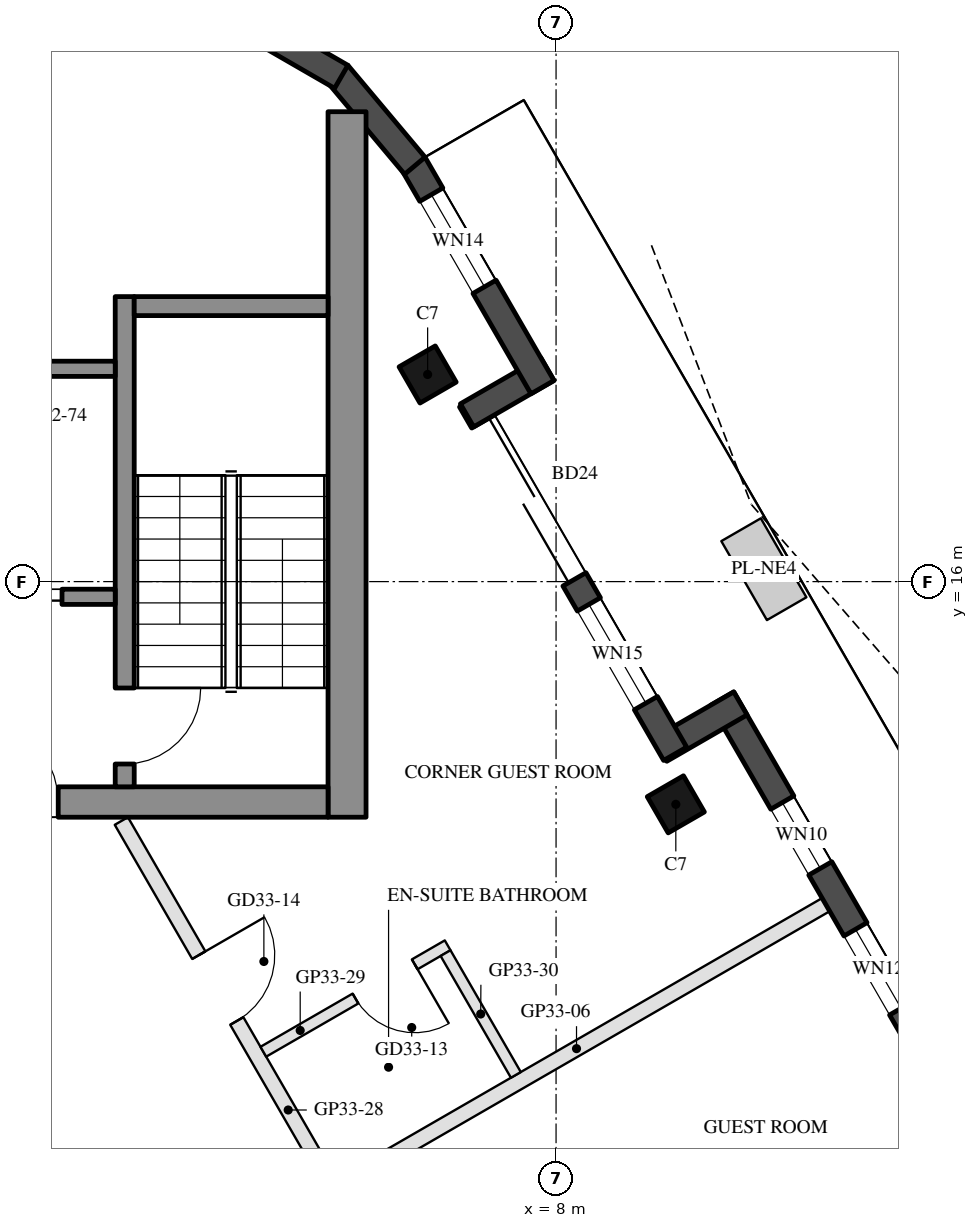
"""IFC4 building model, lengths in metres.
Left out: names, types, materials, properties, quantities, classifications, styles, units other than length and angle.
Written with IfcOpenShell. Run it as: python <this file> out.ifc"""

import sys

from ifc_helpers import new_model, si_unit, direction, frame, frame_2d, origin, origin_2d, place, context, subcontext, project, spatial, rectangle, hollow_rectangle, extrude, boolean, halfspace, element, fill, save


model = new_model("IFC4")
c1 = context("Model", 3, precision=1e-05, world=origin(), true_north=direction((0.0, 1.0)))
c2 = subcontext(c1, "Body", "Model", "MODEL_VIEW")
j1 = project(units=[si_unit("LENGTHUNIT", "METRE"), si_unit("PLANEANGLEUNIT", "RADIAN")], contexts=[c1])
p1 = place(None, origin())
s1 = spatial("IfcSite", under=j1, at=p1, CompositionType="ELEMENT")
p2 = place(p1, origin())
s2 = spatial("IfcBuilding", under=s1, at=p2, CompositionType="ELEMENT")
p3 = place(p2, frame((0.0, 0.0, 317.0)))
s3 = spatial("IfcBuildingStorey", under=s2, at=p3, CompositionType="ELEMENT", Elevation=317.0)
p4 = place(p3, frame((9.576, 13.07, 0.0), z_axis=(0.0, 0.0, 1.0), x_axis=(-0.5, 0.866025403784, 0.0)))
e1 = element("IfcColumn", 1, at=p4, inside=s3, PredefinedType="COLUMN", context=c2, shape_type="SweptSolid", body=[
    boolean("DIFFERENCE", extrude(hollow_rectangle(XDim=0.55, YDim=0.55, WallThickness=0.025, at=origin_2d()), origin(), (0.0, 0.0, 1.0), 3.7), halfspace(frame((0.0, 0.0, 3.666), z_axis=(0.0, 0.0, 1.0), x_axis=(1.0, 0.0, 0.0)), False)),
])
p5 = place(p3, frame((6.31, 18.725, 0.0), z_axis=(0.0, 0.0, 1.0), x_axis=(-0.5, 0.866025403784, 0.0)))
e2 = element("IfcColumn", 2, at=p5, inside=s3, PredefinedType="COLUMN", context=c2, shape_type="SweptSolid", body=[
    boolean("DIFFERENCE", extrude(hollow_rectangle(XDim=0.55, YDim=0.55, WallThickness=0.025, at=origin_2d()), origin(), (0.0, 0.0, 1.0), 3.7), halfspace(frame((0.0, 0.0, 3.66), z_axis=(0.0, 0.0, 1.0), x_axis=(1.0, 0.0, 0.0)), False)),
])
p6 = place(p3, frame((14.352, 7.247, 0.0), z_axis=(0.0, 0.0, 1.0), x_axis=(-0.499993893925, 0.8660289291, 0.0)))
e3 = element("IfcWall", 3, at=p6, inside=s3, PredefinedType="SOLIDWALL", context=c2, shape_type="SweptSolid", body=[
    extrude(rectangle(XDim=8.331, YDim=0.35, at=frame_2d((4.165, 0.0))), origin(), (0.0, 0.0, 1.0), 3.55),
])
p7 = place(p6, frame((1.525, 0.0, 0.0)))
e4 = element("IfcOpeningElement", 4, at=p7, cuts=e3, PredefinedType="OPENING", context=c2, shape_type="SweptSolid", body=[
    extrude(rectangle(XDim=1.8, YDim=2.4, at=frame_2d((0.9, 1.2))), frame((0.0, 0.185, 0.0), z_axis=(0.0, -1.0, 0.0), x_axis=(1.0, 0.0, 0.0)), (0.0, 0.0, 1.0), 0.37),
])
p8 = place(p6, frame((3.625, 0.0, 0.3)))
e5 = element("IfcOpeningElement", 5, at=p8, cuts=e3, PredefinedType="OPENING", context=c2, shape_type="SweptSolid", body=[
    extrude(rectangle(XDim=1.2, YDim=2.65, at=frame_2d((0.6, 1.325))), frame((0.0, 0.185, 0.0), z_axis=(0.0, -1.0, 0.0), x_axis=(1.0, 0.0, 0.0)), (0.0, 0.0, 1.0), 0.37),
])
p9 = place(p6, frame((5.75, 0.0, 0.3)))
e6 = element("IfcOpeningElement", 6, at=p9, cuts=e3, PredefinedType="OPENING", context=c2, shape_type="SweptSolid", body=[
    extrude(rectangle(XDim=1.0, YDim=2.65, at=frame_2d((0.5, 1.325))), frame((0.0, 0.185, 0.0), z_axis=(0.0, -1.0, 0.0), x_axis=(1.0, 0.0, 0.0)), (0.0, 0.0, 1.0), 0.37),
])
p10 = place(p3, frame((10.426, 14.397, 0.0), z_axis=(0.0, 0.0, 1.0), x_axis=(-0.866005645448, -0.500034220881, 0.0)))
e7 = element("IfcWall", 7, at=p10, inside=s3, PredefinedType="SOLIDWALL", context=c2, shape_type="SweptSolid", body=[
    extrude(rectangle(XDim=1.22, YDim=0.35, at=frame_2d((0.61, 0.0))), origin(), (0.0, 0.0, 1.0), 3.55),
])
p11 = place(p3, frame((9.567, 13.734, 0.0), z_axis=(0.0, 0.0, 1.0), x_axis=(-0.499996591357, 0.866027371756, 0.0)))
e8 = element("IfcWall", 8, at=p11, inside=s3, PredefinedType="SOLIDWALL", context=c2, shape_type="SweptSolid", body=[
    extrude(rectangle(XDim=5.371, YDim=0.35, at=frame_2d((2.685, 0.0))), origin(), (0.0, 0.0, 1.0), 3.55),
])
p12 = place(p11, frame((2.65, 0.0, 0.0)))
e9 = element("IfcOpeningElement", 9, at=p12, cuts=e8, PredefinedType="OPENING", context=c2, shape_type="SweptSolid", body=[
    extrude(rectangle(XDim=2.4, YDim=2.4, at=frame_2d((1.2, 1.2))), frame((0.0, 0.185, 0.0), z_axis=(0.0, -1.0, 0.0), x_axis=(1.0, 0.0, 0.0)), (0.0, 0.0, 1.0), 0.37),
])
p13 = place(p11, frame((0.77, 0.0, 0.3)))
e10 = element("IfcOpeningElement", 10, at=p13, cuts=e8, PredefinedType="OPENING", context=c2, shape_type="SweptSolid", body=[
    extrude(rectangle(XDim=1.5, YDim=2.65, at=frame_2d((0.75, 1.325))), frame((0.0, 0.185, 0.0), z_axis=(0.0, -1.0, 0.0), x_axis=(1.0, 0.0, 0.0)), (0.0, 0.0, 1.0), 0.37),
])
p14 = place(p3, frame((6.829, 18.188, 0.0), z_axis=(0.0, 0.0, 1.0), x_axis=(0.866042269935, 0.499970785833, 0.0)))
e11 = element("IfcWall", 11, at=p14, inside=s3, PredefinedType="SOLIDWALL", context=c2, shape_type="SweptSolid", body=[
    extrude(rectangle(XDim=1.22, YDim=0.35, at=frame_2d((0.61, 0.0))), origin(), (0.0, 0.0, 1.0), 3.55),
])
p15 = place(p3, frame((7.821, 18.558, 0.0), z_axis=(0.0, 0.0, 1.0), x_axis=(-0.500000656212, 0.86602502492, 0.0)))
e12 = element("IfcWall", 12, at=p15, inside=s3, PredefinedType="SOLIDWALL", context=c2, shape_type="SweptSolid", body=[
    extrude(rectangle(XDim=3.393, YDim=0.35, at=frame_2d((1.697, 0.0))), origin(), (0.0, 0.0, 1.0), 3.55),
])
p16 = place(p15, frame((1.525, 0.0, 0.3)))
e13 = element("IfcOpeningElement", 13, at=p16, cuts=e12, PredefinedType="OPENING", context=c2, shape_type="SweptSolid", body=[
    extrude(rectangle(XDim=1.4, YDim=2.65, at=frame_2d((0.7, 1.325))), frame((0.0, 0.185, 0.0), z_axis=(0.0, -1.0, 0.0), x_axis=(1.0, 0.0, 0.0)), (0.0, 0.0, 1.0), 0.37),
])
for number, where, z_axis, x_axis in (
    (14, (6.142, 21.472, 0.0), (0.0, 0.0, 1.0), (-0.643, 0.766, 0.0)),
    (15, (5.174, 22.642, 0.0), (0.0, 0.0, 1.0), (-0.866, 0.5, 0.0)),
):
    element("IfcWall", number, at=place(p3, frame(where, z_axis=z_axis, x_axis=x_axis)), inside=s3, PredefinedType="SOLIDWALL", context=c2, shape_type="SweptSolid", body=[
        extrude(rectangle(XDim=1.579, YDim=0.35, at=frame_2d((0.79, 0.0))), origin(), (0.0, 0.0, 1.0), 3.55),
    ])
p17 = place(p3, frame((5.25, 12.9, 0.0), z_axis=(0.0, 0.0, 1.0), x_axis=(0.0, 1.0, 0.0)))
e16 = element("IfcWall", 16, at=p17, inside=s3, PredefinedType="SHEAR", context=c2, shape_type="SweptSolid", body=[
    extrude(rectangle(XDim=9.283, YDim=0.5, at=frame_2d((4.641, 0.0))), origin(), (0.0, 0.0, 1.0), 3.5),
])
p18 = place(p3, frame((5.0, 13.1, 0.0), z_axis=(0.0, 0.0, 1.0), x_axis=(-1.0, 0.0, 0.0)))
e17 = element("IfcWall", 17, at=p18, inside=s3, PredefinedType="SHEAR", context=c2, shape_type="SweptSolid", body=[
    extrude(rectangle(XDim=10.0, YDim=0.4, at=frame_2d((5.0, 0.0))), origin(), (0.0, 0.0, 1.0), 3.5),
])
p19 = place(p18, frame((3.55, 0.0, 0.0)))
e18 = element("IfcOpeningElement", 18, at=p19, cuts=e17, PredefinedType="OPENING", context=c2, shape_type="SweptSolid", body=[
    extrude(rectangle(XDim=1.1, YDim=2.1, at=frame_2d((0.55, 1.05))), frame((0.0, 0.21, 0.0), z_axis=(0.0, -1.0, 0.0), x_axis=(1.0, 0.0, 0.0)), (0.0, 0.0, 1.0), 0.42),
])
p20 = place(p18, frame((5.85, 0.0, 0.0)))
e19 = element("IfcOpeningElement", 19, at=p20, cuts=e17, PredefinedType="OPENING", context=c2, shape_type="SweptSolid", body=[
    extrude(rectangle(XDim=1.4, YDim=2.1, at=frame_2d((0.7, 1.05))), frame((0.0, 0.21, 0.0), z_axis=(0.0, -1.0, 0.0), x_axis=(1.0, 0.0, 0.0)), (0.0, 0.0, 1.0), 0.42),
])
p21 = place(p3, frame((2.325, 13.3, 0.0), z_axis=(0.0, 0.0, 1.0), x_axis=(0.0, 1.0, 0.0)))
e20 = element("IfcWall", 20, at=p21, inside=s3, PredefinedType="SHEAR", context=c2, shape_type="SweptSolid", body=[
    extrude(rectangle(XDim=6.45, YDim=0.25, at=frame_2d((3.225, 0.0))), origin(), (0.0, 0.0, 1.0), 3.5),
])
p22 = place(p21, frame((0.3, 0.0, 0.0)))
e21 = element("IfcOpeningElement", 21, at=p22, cuts=e20, PredefinedType="OPENING", context=c2, shape_type="SweptSolid", body=[
    extrude(rectangle(XDim=1.0, YDim=2.1, at=frame_2d((0.5, 1.05))), frame((0.0, 0.135, 0.0), z_axis=(0.0, -1.0, 0.0), x_axis=(1.0, 0.0, 0.0)), (0.0, 0.0, 1.0), 0.27),
])
p23 = place(p3, frame((5.0, 19.625, 0.0), z_axis=(0.0, 0.0, 1.0), x_axis=(-1.0, 0.0, 0.0)))
e22 = element("IfcWall", 22, at=p23, inside=s3, PredefinedType="SHEAR", context=c2, shape_type="SweptSolid", body=[
    extrude(rectangle(XDim=2.55, YDim=0.25, at=frame_2d((1.275, 0.0))), origin(), (0.0, 0.0, 1.0), 3.5),
])
p24 = place(p3, frame((2.2, 18.8, 0.0), z_axis=(0.0, 0.0, 1.0), x_axis=(-1.0, 0.0, 0.0)))
e23 = element("IfcWall", 23, at=p24, inside=s3, PredefinedType="SHEAR", context=c2, shape_type="SweptSolid", body=[
    extrude(rectangle(XDim=2.8, YDim=0.2, at=frame_2d((1.4, 0.0))), origin(), (0.0, 0.0, 1.0), 3.5),
])
p25 = place(p3, frame((2.2, 15.8, 0.0), z_axis=(0.0, 0.0, 1.0), x_axis=(-1.0, 0.0, 0.0)))
e24 = element("IfcWall", 24, at=p25, inside=s3, PredefinedType="SHEAR", context=c2, shape_type="SweptSolid", body=[
    extrude(rectangle(XDim=2.8, YDim=0.2, at=frame_2d((1.4, 0.0))), origin(), (0.0, 0.0, 1.0), 3.5),
])
p26 = place(p25, frame((0.7, 0.0, 0.0)))
e25 = element("IfcOpeningElement", 25, at=p26, cuts=e24, PredefinedType="OPENING", context=c2, shape_type="SweptSolid", body=[
    extrude(rectangle(XDim=1.2, YDim=2.1, at=frame_2d((0.6, 1.05))), frame((0.0, 0.11, 0.0), z_axis=(0.0, -1.0, 0.0), x_axis=(1.0, 0.0, 0.0)), (0.0, 0.0, 1.0), 0.22),
])
p27 = place(p3, frame((11.55, 11.749, 0.0), z_axis=(0.0, 0.0, 1.0), x_axis=(-0.866019793702, -0.500009716822, 0.0)))
e26 = element("IfcWall", 26, at=p27, inside=s3, PredefinedType="PARTITIONING", context=c2, shape_type="SweptSolid", body=[
    extrude(rectangle(XDim=7.577, YDim=0.2, at=frame_2d((3.789, 0.0))), origin(), (0.0, 0.0, 1.0), 3.1),
])
p28 = place(p3, frame((2.281, 12.85, 0.0), z_axis=(0.0, 0.0, 1.0), x_axis=(0.500004836318, -0.866022611517, 0.0)))
e27 = element("IfcWall", 27, at=p28, inside=s3, PredefinedType="PARTITIONING", context=c2, shape_type="SweptSolid", body=[
    extrude(rectangle(XDim=5.488, YDim=0.2, at=frame_2d((2.744, 0.0))), origin(), (0.0, 0.0, 1.0), 3.1),
])
p29 = place(p28, frame((2.038, 0.0, 0.0)))
e28 = element("IfcOpeningElement", 28, at=p29, cuts=e27, PredefinedType="OPENING", context=c2, shape_type="SweptSolid", body=[
    extrude(rectangle(XDim=1.0, YDim=2.1, at=frame_2d((0.5, 1.05))), frame((0.0, 0.11, 0.0), z_axis=(0.0, -1.0, 0.0), x_axis=(1.0, 0.0, 0.0)), (0.0, 0.0, 1.0), 0.22),
])
p30 = place(p3, frame((6.573, 11.214, 0.0), z_axis=(0.0, 0.0, 1.0), x_axis=(-0.866034573852, -0.49998411664, 0.0)))
e29 = element("IfcWall", 29, at=p30, inside=s3, PredefinedType="PARTITIONING", context=c2, shape_type="SweptSolid", body=[
    extrude(rectangle(XDim=2.8, YDim=0.15, at=frame_2d((1.4, 0.0))), origin(), (0.0, 0.0, 1.0), 3.1),
])
p31 = place(p30, frame((0.5, 0.0, 0.0)))
e30 = element("IfcOpeningElement", 30, at=p31, cuts=e29, PredefinedType="OPENING", context=c2, shape_type="SweptSolid", body=[
    extrude(rectangle(XDim=0.9, YDim=2.1, at=frame_2d((0.45, 1.05))), frame((0.0, 0.085, 0.0), z_axis=(0.0, -1.0, 0.0), x_axis=(1.0, 0.0, 0.0)), (0.0, 0.0, 1.0), 0.17),
])
p32 = place(p3, frame((7.471, 9.51, 0.0), z_axis=(0.0, 0.0, 1.0), x_axis=(-0.499985172903, 0.866033964044, 0.0)))
e31 = element("IfcWall", 31, at=p32, inside=s3, PredefinedType="PARTITIONING", context=c2, shape_type="SweptSolid", body=[
    extrude(rectangle(XDim=1.85, YDim=0.15, at=frame_2d((0.925, 0.0))), origin(), (0.0, 0.0, 1.0), 3.55),
])
p33 = place(p8, origin())
e32 = element("IfcWindow", 32, at=p33, inside=s3, PartitioningType="SINGLE_PANEL", PredefinedType="WINDOW", context=c2, shape_type="SweptSolid", body=[
    extrude(rectangle(XDim=1.2, YDim=2.65, at=frame_2d((0.6, 1.325))), frame((0.0, 0.03, 0.0), z_axis=(0.0, -1.0, 0.0), x_axis=(1.0, 0.0, 0.0)), (0.0, 0.0, 1.0), 0.06),
])
fill(e5, e32)
p34 = place(p9, origin())
e33 = element("IfcWindow", 33, at=p34, inside=s3, PartitioningType="SINGLE_PANEL", PredefinedType="WINDOW", context=c2, shape_type="SweptSolid", body=[
    extrude(rectangle(XDim=1.0, YDim=2.65, at=frame_2d((0.5, 1.325))), frame((0.0, 0.03, 0.0), z_axis=(0.0, -1.0, 0.0), x_axis=(1.0, 0.0, 0.0)), (0.0, 0.0, 1.0), 0.06),
])
fill(e6, e33)
p35 = place(p12, frame((2.4, 0.0, 0.0), z_axis=(0.0, 0.0, 1.0), x_axis=(-1.0, 0.0, 0.0)))
e34 = element("IfcDoor", 34, at=p35, inside=s3, OperationType="SLIDING_TO_LEFT", PredefinedType="DOOR", context=c2, shape_type="SweptSolid", body=[
    extrude(rectangle(XDim=2.4, YDim=2.4, at=frame_2d((1.2, 1.2))), frame((0.0, 0.025, 0.0), z_axis=(0.0, -1.0, 0.0), x_axis=(1.0, 0.0, 0.0)), (0.0, 0.0, 1.0), 0.05),
])
fill(e9, e34)
p36 = place(p13, origin())
e35 = element("IfcWindow", 35, at=p36, inside=s3, PartitioningType="SINGLE_PANEL", PredefinedType="WINDOW", context=c2, shape_type="SweptSolid", body=[
    extrude(rectangle(XDim=1.5, YDim=2.65, at=frame_2d((0.75, 1.325))), frame((0.0, 0.03, 0.0), z_axis=(0.0, -1.0, 0.0), x_axis=(1.0, 0.0, 0.0)), (0.0, 0.0, 1.0), 0.06),
])
fill(e10, e35)
p37 = place(p16, origin())
e36 = element("IfcWindow", 36, at=p37, inside=s3, PartitioningType="SINGLE_PANEL", PredefinedType="WINDOW", context=c2, shape_type="SweptSolid", body=[
    extrude(rectangle(XDim=1.4, YDim=2.65, at=frame_2d((0.7, 1.325))), frame((0.0, 0.03, 0.0), z_axis=(0.0, -1.0, 0.0), x_axis=(1.0, 0.0, 0.0)), (0.0, 0.0, 1.0), 0.06),
])
fill(e13, e36)
p38 = place(p26, origin())
e37 = element("IfcDoor", 37, at=p38, inside=s3, OperationType="DOUBLE_DOOR_SLIDING", PredefinedType="DOOR", context=c2, shape_type="SweptSolid", body=[
    extrude(rectangle(XDim=1.2, YDim=2.1, at=frame_2d((0.6, 1.05))), frame((0.0, 0.025, 0.0), z_axis=(0.0, -1.0, 0.0), x_axis=(1.0, 0.0, 0.0)), (0.0, 0.0, 1.0), 0.05),
])
fill(e25, e37)
p39 = place(p19, frame((1.1, 0.0, 0.0), z_axis=(0.0, 0.0, 1.0), x_axis=(-1.0, 0.0, 0.0)))
e38 = element("IfcDoor", 38, at=p39, inside=s3, OperationType="SINGLE_SWING_LEFT", PredefinedType="DOOR", context=c2, shape_type="SweptSolid", body=[
    extrude(rectangle(XDim=1.1, YDim=2.1, at=frame_2d((0.55, 1.05))), frame((0.0, 0.025, 0.0), z_axis=(0.0, -1.0, 0.0), x_axis=(1.0, 0.0, 0.0)), (0.0, 0.0, 1.0), 0.05),
])
fill(e18, e38)
p40 = place(p22, frame((1.0, 0.0, 0.0), z_axis=(0.0, 0.0, 1.0), x_axis=(-1.0, 0.0, 0.0)))
e39 = element("IfcDoor", 39, at=p40, inside=s3, OperationType="SINGLE_SWING_LEFT", PredefinedType="DOOR", context=c2, shape_type="SweptSolid", body=[
    extrude(rectangle(XDim=1.0, YDim=2.1, at=frame_2d((0.5, 1.05))), frame((0.0, 0.025, 0.0), z_axis=(0.0, -1.0, 0.0), x_axis=(1.0, 0.0, 0.0)), (0.0, 0.0, 1.0), 0.05),
])
fill(e21, e39)
p41 = place(p31, origin())
e40 = element("IfcDoor", 40, at=p41, inside=s3, OperationType="SINGLE_SWING_LEFT", PredefinedType="DOOR", context=c2, shape_type="SweptSolid", body=[
    extrude(rectangle(XDim=0.9, YDim=2.1, at=frame_2d((0.45, 1.05))), frame((0.0, 0.025, 0.0), z_axis=(0.0, -1.0, 0.0), x_axis=(1.0, 0.0, 0.0)), (0.0, 0.0, 1.0), 0.05),
])
fill(e30, e40)
p42 = place(p29, origin())
e41 = element("IfcDoor", 41, at=p42, inside=s3, OperationType="SINGLE_SWING_LEFT", PredefinedType="DOOR", context=c2, shape_type="SweptSolid", body=[
    extrude(rectangle(XDim=1.0, YDim=2.1, at=frame_2d((0.5, 1.05))), frame((0.0, 0.025, 0.0), z_axis=(0.0, -1.0, 0.0), x_axis=(1.0, 0.0, 0.0)), (0.0, 0.0, 1.0), 0.05),
])
fill(e28, e41)
save(model, sys.argv[1])
